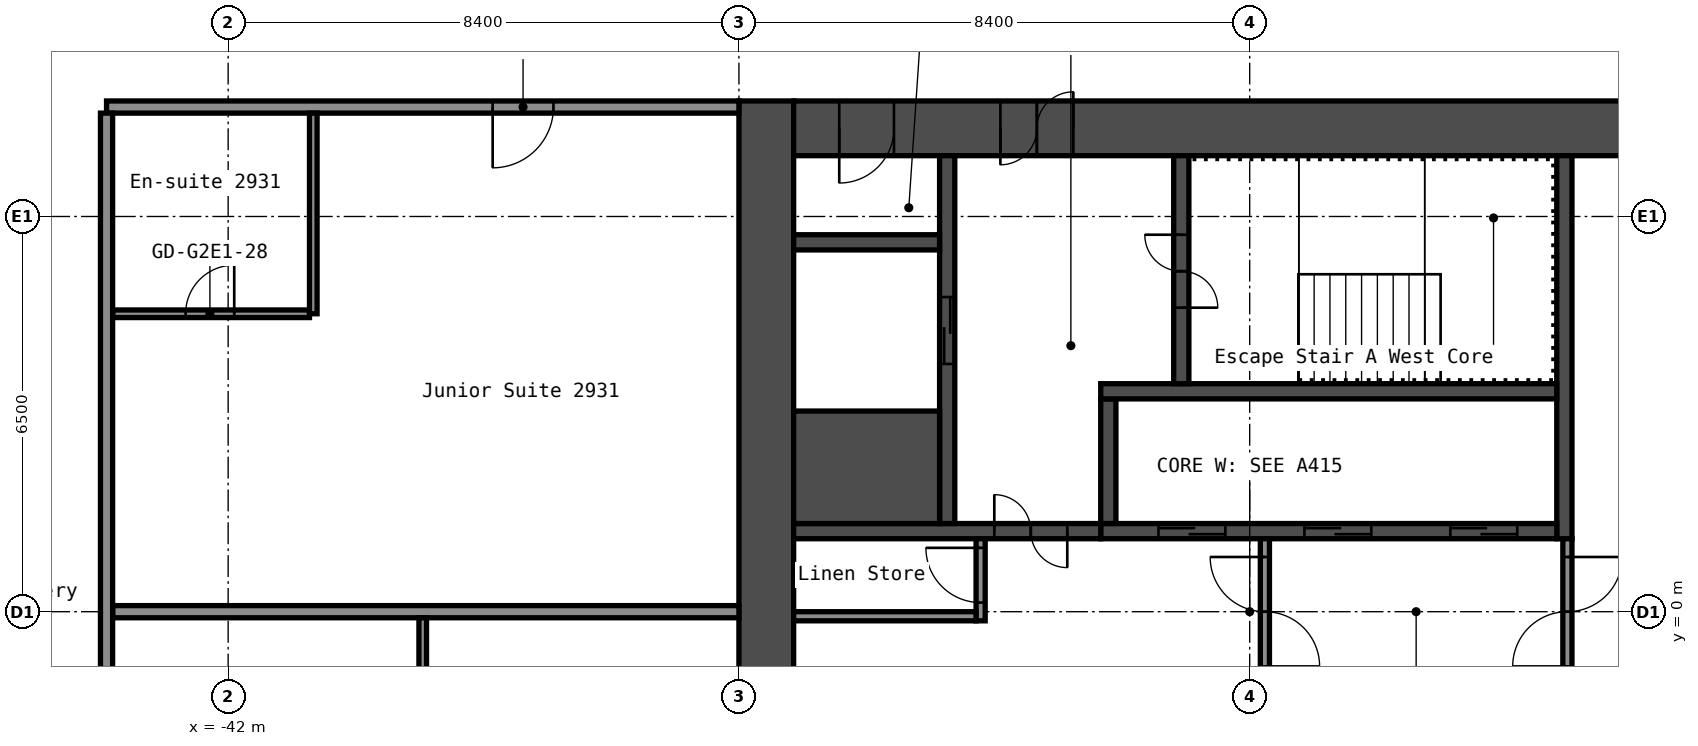
"""IFC4 building model, lengths in metres.
Left out: names, types, materials, properties, quantities, classifications, styles, units other than length and angle.
Written with IfcOpenShell. Run it as: python <this file> out.ifc"""

import sys

from ifc_helpers import new_model, si_unit, direction, frame, frame_2d, origin, place, context, subcontext, project, spatial, rectangle, extrude, element, fill, save


model = new_model("IFC4")
c1 = context("Model", 3, precision=1e-05, world=origin(), true_north=direction((0.0, 1.0)))
c2 = subcontext(c1, "Body", "Model", "MODEL_VIEW")
j1 = project(units=[si_unit("LENGTHUNIT", "METRE"), si_unit("PLANEANGLEUNIT", "RADIAN")], contexts=[c1])
p1 = place(None, origin())
s1 = spatial("IfcSite", under=j1, at=p1, CompositionType="ELEMENT")
p2 = place(p1, origin())
s2 = spatial("IfcBuilding", under=s1, at=p2, CompositionType="ELEMENT")
p3 = place(p2, frame((0.0, 0.0, 104.2)))
s3 = spatial("IfcBuildingStorey", under=s2, at=p3, CompositionType="ELEMENT", Elevation=104.2)
p4 = place(p3, frame((-33.15, -8.4, 0.0), z_axis=(0.0, 0.0, 1.0), x_axis=(0.0, 1.0, 0.0)))
e1 = element("IfcWall", 1, at=p4, inside=s3, PredefinedType="SHEAR", context=c2, shape_type="SweptSolid", body=[
    extrude(rectangle(XDim=16.8, YDim=0.9, at=frame_2d((8.4, 0.0))), origin(), (0.0, 0.0, 1.0), 2.8),
])
p5 = place(p3, frame((-32.7, 7.95, 0.0), z_axis=(0.0, 0.0, 1.0), x_axis=(1.0, 0.0, 0.0)))
e2 = element("IfcWall", 2, at=p5, inside=s3, PredefinedType="SHEAR", context=c2, shape_type="SweptSolid", body=[
    extrude(rectangle(XDim=15.0, YDim=0.9, at=frame_2d((7.5, 0.0))), origin(), (0.0, 0.0, 1.0), 2.8),
])
p6 = place(p5, frame((3.4, 0.0, 0.0)))
e3 = element("IfcOpeningElement", 3, at=p6, cuts=e2, PredefinedType="OPENING", context=c2, shape_type="SweptSolid", body=[
    extrude(rectangle(XDim=1.2, YDim=2.1, at=frame_2d((0.6, 1.05))), frame((0.0, 0.46, 0.0), z_axis=(0.0, -1.0, 0.0), x_axis=(1.0, 0.0, 0.0)), (0.0, 0.0, 1.0), 0.92),
])
p7 = place(p5, frame((0.75, 0.0, 0.0)))
e4 = element("IfcOpeningElement", 4, at=p7, cuts=e2, PredefinedType="OPENING", context=c2, shape_type="SweptSolid", body=[
    extrude(rectangle(XDim=0.9, YDim=2.1, at=frame_2d((0.45, 1.05))), frame((0.0, 0.46, 0.0), z_axis=(0.0, -1.0, 0.0), x_axis=(1.0, 0.0, 0.0)), (0.0, 0.0, 1.0), 0.92),
])
p8 = place(p3, frame((-20.025, 1.2, 0.0), z_axis=(0.0, 0.0, 1.0), x_axis=(0.0, 1.0, 0.0)))
e5 = element("IfcWall", 5, at=p8, inside=s3, PredefinedType="SHEAR", context=c2, shape_type="SweptSolid", body=[
    extrude(rectangle(XDim=6.3, YDim=0.25, at=frame_2d((3.15, 0.0))), origin(), (0.0, 0.0, 1.0), 2.8),
])
p9 = place(p3, frame((-27.65, 1.325, 0.0), z_axis=(0.0, 0.0, 1.0), x_axis=(1.0, 0.0, 0.0)))
e6 = element("IfcWall", 6, at=p9, inside=s3, PredefinedType="SHEAR", context=c2, shape_type="SweptSolid", body=[
    extrude(rectangle(XDim=7.5, YDim=0.25, at=frame_2d((3.75, 0.0))), origin(), (0.0, 0.0, 1.0), 2.8),
])
p10 = place(p9, frame((5.75, 0.0, 0.0)))
e7 = element("IfcOpeningElement", 7, at=p10, cuts=e6, PredefinedType="OPENING", context=c2, shape_type="SweptSolid", body=[
    extrude(rectangle(XDim=1.1, YDim=2.1, at=frame_2d((0.55, 1.05))), frame((0.0, 0.135, 0.0), z_axis=(0.0, -1.0, 0.0), x_axis=(1.0, 0.0, 0.0)), (0.0, 0.0, 1.0), 0.27),
])
p11 = place(p9, frame((3.35, 0.0, 0.0)))
e8 = element("IfcOpeningElement", 8, at=p11, cuts=e6, PredefinedType="OPENING", context=c2, shape_type="SweptSolid", body=[
    extrude(rectangle(XDim=1.1, YDim=2.1, at=frame_2d((0.55, 1.05))), frame((0.0, 0.135, 0.0), z_axis=(0.0, -1.0, 0.0), x_axis=(1.0, 0.0, 0.0)), (0.0, 0.0, 1.0), 0.27),
])
p12 = place(p9, frame((0.95, 0.0, 0.0)))
e9 = element("IfcOpeningElement", 9, at=p12, cuts=e6, PredefinedType="OPENING", context=c2, shape_type="SweptSolid", body=[
    extrude(rectangle(XDim=1.1, YDim=2.1, at=frame_2d((0.55, 1.05))), frame((0.0, 0.135, 0.0), z_axis=(0.0, -1.0, 0.0), x_axis=(1.0, 0.0, 0.0)), (0.0, 0.0, 1.0), 0.27),
])
p13 = place(p3, frame((-27.525, 1.45, 0.0), z_axis=(0.0, 0.0, 1.0), x_axis=(0.0, 1.0, 0.0)))
e10 = element("IfcWall", 10, at=p13, inside=s3, PredefinedType="SHEAR", context=c2, shape_type="SweptSolid", body=[
    extrude(rectangle(XDim=2.05, YDim=0.25, at=frame_2d((1.025, 0.0))), origin(), (0.0, 0.0, 1.0), 2.8),
])
p14 = place(p3, frame((-27.65, 3.625, 0.0), z_axis=(0.0, 0.0, 1.0), x_axis=(1.0, 0.0, 0.0)))
e11 = element("IfcWall", 11, at=p14, inside=s3, PredefinedType="SHEAR", context=c2, shape_type="SweptSolid", body=[
    extrude(rectangle(XDim=7.5, YDim=0.25, at=frame_2d((3.75, 0.0))), origin(), (0.0, 0.0, 1.0), 2.8),
])
p15 = place(p3, frame((-26.325, 3.75, 0.0), z_axis=(0.0, 0.0, 1.0), x_axis=(0.0, 1.0, 0.0)))
e12 = element("IfcWall", 12, at=p15, inside=s3, PredefinedType="SHEAR", context=c2, shape_type="SweptSolid", body=[
    extrude(rectangle(XDim=3.75, YDim=0.25, at=frame_2d((1.875, 0.0))), origin(), (0.0, 0.0, 1.0), 2.8),
])
p16 = place(p15, frame((1.25, 0.0, 0.0)))
e13 = element("IfcOpeningElement", 13, at=p16, cuts=e12, PredefinedType="OPENING", context=c2, shape_type="SweptSolid", body=[
    extrude(rectangle(XDim=1.2, YDim=2.1, at=frame_2d((0.6, 1.05))), frame((0.0, 0.135, 0.0), z_axis=(0.0, -1.0, 0.0), x_axis=(1.0, 0.0, 0.0)), (0.0, 0.0, 1.0), 0.27),
])
p17 = place(p3, frame((-32.7, 1.325, 0.0), z_axis=(0.0, 0.0, 1.0), x_axis=(1.0, 0.0, 0.0)))
e14 = element("IfcWall", 14, at=p17, inside=s3, PredefinedType="SHEAR", context=c2, shape_type="SweptSolid", body=[
    extrude(rectangle(XDim=5.05, YDim=0.25, at=frame_2d((2.525, 0.0))), origin(), (0.0, 0.0, 1.0), 2.8),
])
p18 = place(p17, frame((3.3, 0.0, 0.0)))
e15 = element("IfcOpeningElement", 15, at=p18, cuts=e14, PredefinedType="OPENING", context=c2, shape_type="SweptSolid", body=[
    extrude(rectangle(XDim=1.2, YDim=2.1, at=frame_2d((0.6, 1.05))), frame((0.0, 0.135, 0.0), z_axis=(0.0, -1.0, 0.0), x_axis=(1.0, 0.0, 0.0)), (0.0, 0.0, 1.0), 0.27),
])
p19 = place(p3, frame((-30.175, 1.45, 0.0), z_axis=(0.0, 0.0, 1.0), x_axis=(0.0, 1.0, 0.0)))
e16 = element("IfcWall", 16, at=p19, inside=s3, PredefinedType="SHEAR", context=c2, shape_type="SweptSolid", body=[
    extrude(rectangle(XDim=6.05, YDim=0.25, at=frame_2d((3.025, 0.0))), origin(), (0.0, 0.0, 1.0), 2.8),
])
p20 = place(p19, frame((2.625, 0.0, 0.0)))
e17 = element("IfcOpeningElement", 17, at=p20, cuts=e16, PredefinedType="OPENING", context=c2, shape_type="SweptSolid", body=[
    extrude(rectangle(XDim=1.1, YDim=2.1, at=frame_2d((0.55, 1.05))), frame((0.0, 0.135, 0.0), z_axis=(0.0, -1.0, 0.0), x_axis=(1.0, 0.0, 0.0)), (0.0, 0.0, 1.0), 0.27),
])
p21 = place(p3, frame((-32.7, 2.375, 0.0), z_axis=(0.0, 0.0, 1.0), x_axis=(1.0, 0.0, 0.0)))
e18 = element("IfcWall", 18, at=p21, inside=s3, PredefinedType="SHEAR", context=c2, shape_type="SweptSolid", body=[
    extrude(rectangle(XDim=2.4, YDim=1.85, at=frame_2d((1.2, 0.0))), origin(), (0.0, 0.0, 1.0), 2.8),
])
p22 = place(p3, frame((-32.7, 6.075, 0.0), z_axis=(0.0, 0.0, 1.0), x_axis=(1.0, 0.0, 0.0)))
e19 = element("IfcWall", 19, at=p22, inside=s3, PredefinedType="SHEAR", context=c2, shape_type="SweptSolid", body=[
    extrude(rectangle(XDim=2.4, YDim=0.25, at=frame_2d((1.2, 0.0))), origin(), (0.0, 0.0, 1.0), 2.8),
])
p23 = place(p3, frame((-19.975, -1.2, 0.0), z_axis=(0.0, 0.0, 1.0), x_axis=(0.0, 1.0, 0.0)))
e20 = element("IfcWall", 20, at=p23, inside=s3, PredefinedType="PARTITIONING", context=c2, shape_type="SweptSolid", body=[
    extrude(rectangle(XDim=2.4, YDim=0.15, at=frame_2d((1.2, 0.0))), origin(), (0.0, 0.0, 1.0), 2.8),
])
p24 = place(p23, frame((0.3, 0.0, 0.0)))
e21 = element("IfcOpeningElement", 21, at=p24, cuts=e20, PredefinedType="OPENING", context=c2, shape_type="SweptSolid", body=[
    extrude(rectangle(XDim=1.8, YDim=2.1, at=frame_2d((0.9, 1.05))), frame((0.0, 0.085, 0.0), z_axis=(0.0, -1.0, 0.0), x_axis=(1.0, 0.0, 0.0)), (0.0, 0.0, 1.0), 0.17),
])
p25 = place(p3, frame((-24.95, -1.2, 0.0), z_axis=(0.0, 0.0, 1.0), x_axis=(0.0, 1.0, 0.0)))
e22 = element("IfcWall", 22, at=p25, inside=s3, PredefinedType="PARTITIONING", context=c2, shape_type="SweptSolid", body=[
    extrude(rectangle(XDim=2.4, YDim=0.15, at=frame_2d((1.2, 0.0))), origin(), (0.0, 0.0, 1.0), 2.8),
])
p26 = place(p25, frame((0.3, 0.0, 0.0)))
e23 = element("IfcOpeningElement", 23, at=p26, cuts=e22, PredefinedType="OPENING", context=c2, shape_type="SweptSolid", body=[
    extrude(rectangle(XDim=1.8, YDim=2.1, at=frame_2d((0.9, 1.05))), frame((0.0, 0.085, 0.0), z_axis=(0.0, -1.0, 0.0), x_axis=(1.0, 0.0, 0.0)), (0.0, 0.0, 1.0), 0.17),
])
p27 = place(p3, frame((-29.625, -0.15, 0.0), z_axis=(0.0, 0.0, 1.0), x_axis=(0.0, 1.0, 0.0)))
e24 = element("IfcWall", 24, at=p27, inside=s3, PredefinedType="PARTITIONING", context=c2, shape_type="SweptSolid", body=[
    extrude(rectangle(XDim=1.35, YDim=0.15, at=frame_2d((0.675, 0.0))), origin(), (0.0, 0.0, 1.0), 2.8),
])
p28 = place(p27, frame((0.3, 0.0, 0.0)))
e25 = element("IfcOpeningElement", 25, at=p28, cuts=e24, PredefinedType="OPENING", context=c2, shape_type="SweptSolid", body=[
    extrude(rectangle(XDim=0.9, YDim=2.1, at=frame_2d((0.45, 1.05))), frame((0.0, 0.085, 0.0), z_axis=(0.0, -1.0, 0.0), x_axis=(1.0, 0.0, 0.0)), (0.0, 0.0, 1.0), 0.17),
])
p29 = place(p3, frame((-32.7, -0.075, 0.0), z_axis=(0.0, 0.0, 1.0), x_axis=(1.0, 0.0, 0.0)))
e26 = element("IfcWall", 26, at=p29, inside=s3, PredefinedType="PARTITIONING", context=c2, shape_type="SweptSolid", body=[
    extrude(rectangle(XDim=3.0, YDim=0.15, at=frame_2d((1.5, 0.0))), origin(), (0.0, 0.0, 1.0), 2.8),
])
p30 = place(p3, frame((-43.9, 0.0, 0.0), z_axis=(0.0, 0.0, 1.0), x_axis=(1.0, 0.0, 0.0)))
e27 = element("IfcWall", 27, at=p30, inside=s3, PredefinedType="PARTITIONING", context=c2, shape_type="SweptSolid", body=[
    extrude(rectangle(XDim=10.3, YDim=0.2, at=frame_2d((5.15, 0.0))), origin(), (0.0, 0.0, 1.0), 2.8),
])
p31 = place(p3, frame((-43.9, 4.9, 0.0), z_axis=(0.0, 0.0, 1.0), x_axis=(1.0, 0.0, 0.0)))
e28 = element("IfcWall", 28, at=p31, inside=s3, PredefinedType="PARTITIONING", context=c2, shape_type="SweptSolid", body=[
    extrude(rectangle(XDim=3.237, YDim=0.125, at=frame_2d((1.619, 0.0))), origin(), (0.0, 0.0, 1.0), 2.8),
])
p32 = place(p31, frame((1.2, 0.0, 0.0)))
e29 = element("IfcOpeningElement", 29, at=p32, cuts=e28, PredefinedType="OPENING", context=c2, shape_type="SweptSolid", body=[
    extrude(rectangle(XDim=0.8, YDim=2.1, at=frame_2d((0.4, 1.05))), frame((0.0, 0.073, 0.0), z_axis=(0.0, -1.0, 0.0), x_axis=(1.0, 0.0, 0.0)), (0.0, 0.0, 1.0), 0.145),
])
p33 = place(p3, frame((-44.0, 8.3, 0.0), z_axis=(0.0, 0.0, 1.0), x_axis=(1.0, 0.0, 0.0)))
e30 = element("IfcWall", 30, at=p33, inside=s3, PredefinedType="PARTITIONING", context=c2, shape_type="SweptSolid", body=[
    extrude(rectangle(XDim=10.4, YDim=0.2, at=frame_2d((5.2, 0.0))), origin(), (0.0, 0.0, 1.0), 2.8),
])
p34 = place(p33, frame((6.35, 0.0, 0.0)))
e31 = element("IfcOpeningElement", 31, at=p34, cuts=e30, PredefinedType="OPENING", context=c2, shape_type="SweptSolid", body=[
    extrude(rectangle(XDim=1.0, YDim=2.1, at=frame_2d((0.5, 1.05))), frame((0.0, 0.11, 0.0), z_axis=(0.0, -1.0, 0.0), x_axis=(1.0, 0.0, 0.0)), (0.0, 0.0, 1.0), 0.22),
])
p35 = place(p3, frame((-44.0, -8.2, 0.0), z_axis=(0.0, 0.0, 1.0), x_axis=(0.0, 1.0, 0.0)))
e32 = element("IfcWall", 32, at=p35, inside=s3, PredefinedType="PARTITIONING", context=c2, shape_type="SweptSolid", body=[
    extrude(rectangle(XDim=16.4, YDim=0.2, at=frame_2d((8.2, 0.0))), origin(), (0.0, 0.0, 1.0), 2.8),
])
p36 = place(p3, frame((-40.6, 4.9, 0.0), z_axis=(0.0, 0.0, 1.0), x_axis=(0.0, 1.0, 0.0)))
e33 = element("IfcWall", 33, at=p36, inside=s3, PredefinedType="PARTITIONING", context=c2, shape_type="SweptSolid", body=[
    extrude(rectangle(XDim=3.3, YDim=0.125, at=frame_2d((1.65, 0.0))), origin(), (0.0, 0.0, 1.0), 2.8),
])
p37 = place(p3, frame((-38.8, -8.2, 0.0), z_axis=(0.0, 0.0, 1.0), x_axis=(0.0, 1.0, 0.0)))
e34 = element("IfcWall", 34, at=p37, inside=s3, PredefinedType="PARTITIONING", context=c2, shape_type="SweptSolid", body=[
    extrude(rectangle(XDim=8.1, YDim=0.125, at=frame_2d((4.05, 0.0))), origin(), (0.0, 0.0, 1.0), 2.8),
])
p38 = place(p37, frame((4.05, 0.0, 0.0)))
e35 = element("IfcOpeningElement", 35, at=p38, cuts=e34, PredefinedType="OPENING", context=c2, shape_type="SweptSolid", body=[
    extrude(rectangle(XDim=0.9, YDim=2.1, at=frame_2d((0.45, 1.05))), frame((0.0, 0.073, 0.0), z_axis=(0.0, -1.0, 0.0), x_axis=(1.0, 0.0, 0.0)), (0.0, 0.0, 1.0), 0.145),
])
p39 = place(p6, origin())
e36 = element("IfcDoor", 36, at=p39, inside=s3, OperationType="DOUBLE_DOOR_SINGLE_SWING", PredefinedType="DOOR", context=c2, shape_type="SweptSolid", body=[
    extrude(rectangle(XDim=1.2, YDim=2.1, at=frame_2d((0.6, 1.05))), frame((0.0, 0.025, 0.0), z_axis=(0.0, -1.0, 0.0), x_axis=(1.0, 0.0, 0.0)), (0.0, 0.0, 1.0), 0.05),
])
fill(e3, e36)
p40 = place(p7, origin())
e37 = element("IfcDoor", 37, at=p40, inside=s3, OperationType="SINGLE_SWING_LEFT", PredefinedType="DOOR", context=c2, shape_type="SweptSolid", body=[
    extrude(rectangle(XDim=0.9, YDim=2.1, at=frame_2d((0.45, 1.05))), frame((0.0, 0.025, 0.0), z_axis=(0.0, -1.0, 0.0), x_axis=(1.0, 0.0, 0.0)), (0.0, 0.0, 1.0), 0.05),
])
fill(e4, e37)
p41 = place(p16, origin())
e38 = element("IfcDoor", 38, at=p41, inside=s3, OperationType="DOUBLE_DOOR_SINGLE_SWING", PredefinedType="DOOR", context=c2, shape_type="SweptSolid", body=[
    extrude(rectangle(XDim=1.2, YDim=2.1, at=frame_2d((0.6, 1.05))), frame((0.0, 0.025, 0.0), z_axis=(0.0, -1.0, 0.0), x_axis=(1.0, 0.0, 0.0)), (0.0, 0.0, 1.0), 0.05),
])
fill(e13, e38)
p42 = place(p18, origin())
e39 = element("IfcDoor", 39, at=p42, inside=s3, OperationType="DOUBLE_DOOR_SINGLE_SWING", PredefinedType="DOOR", context=c2, shape_type="SweptSolid", body=[
    extrude(rectangle(XDim=1.2, YDim=2.1, at=frame_2d((0.6, 1.05))), frame((0.0, 0.025, 0.0), z_axis=(0.0, -1.0, 0.0), x_axis=(1.0, 0.0, 0.0)), (0.0, 0.0, 1.0), 0.05),
])
fill(e15, e39)
p43 = place(p24, origin())
e40 = element("IfcDoor", 40, at=p43, inside=s3, OperationType="DOUBLE_DOOR_SINGLE_SWING", PredefinedType="DOOR", context=c2, shape_type="SweptSolid", body=[
    extrude(rectangle(XDim=1.8, YDim=2.1, at=frame_2d((0.9, 1.05))), frame((0.0, 0.025, 0.0), z_axis=(0.0, -1.0, 0.0), x_axis=(1.0, 0.0, 0.0)), (0.0, 0.0, 1.0), 0.05),
])
fill(e21, e40)
p44 = place(p26, origin())
e41 = element("IfcDoor", 41, at=p44, inside=s3, OperationType="DOUBLE_DOOR_SINGLE_SWING", PredefinedType="DOOR", context=c2, shape_type="SweptSolid", body=[
    extrude(rectangle(XDim=1.8, YDim=2.1, at=frame_2d((0.9, 1.05))), frame((0.0, 0.025, 0.0), z_axis=(0.0, -1.0, 0.0), x_axis=(1.0, 0.0, 0.0)), (0.0, 0.0, 1.0), 0.05),
])
fill(e23, e41)
p45 = place(p28, origin())
e42 = element("IfcDoor", 42, at=p45, inside=s3, OperationType="SINGLE_SWING_LEFT", PredefinedType="DOOR", context=c2, shape_type="SweptSolid", body=[
    extrude(rectangle(XDim=0.9, YDim=2.1, at=frame_2d((0.45, 1.05))), frame((0.0, 0.025, 0.0), z_axis=(0.0, -1.0, 0.0), x_axis=(1.0, 0.0, 0.0)), (0.0, 0.0, 1.0), 0.05),
])
fill(e25, e42)
p46 = place(p10, origin())
e43 = element("IfcDoor", 43, at=p46, inside=s3, OperationType="DOUBLE_DOOR_SLIDING", PredefinedType="DOOR", context=c2, shape_type="SweptSolid", body=[
    extrude(rectangle(XDim=1.1, YDim=2.1, at=frame_2d((0.55, 1.05))), frame((0.0, 0.025, 0.0), z_axis=(0.0, -1.0, 0.0), x_axis=(1.0, 0.0, 0.0)), (0.0, 0.0, 1.0), 0.05),
])
fill(e7, e43)
p47 = place(p11, origin())
e44 = element("IfcDoor", 44, at=p47, inside=s3, OperationType="DOUBLE_DOOR_SLIDING", PredefinedType="DOOR", context=c2, shape_type="SweptSolid", body=[
    extrude(rectangle(XDim=1.1, YDim=2.1, at=frame_2d((0.55, 1.05))), frame((0.0, 0.025, 0.0), z_axis=(0.0, -1.0, 0.0), x_axis=(1.0, 0.0, 0.0)), (0.0, 0.0, 1.0), 0.05),
])
fill(e8, e44)
p48 = place(p12, origin())
e45 = element("IfcDoor", 45, at=p48, inside=s3, OperationType="DOUBLE_DOOR_SLIDING", PredefinedType="DOOR", context=c2, shape_type="SweptSolid", body=[
    extrude(rectangle(XDim=1.1, YDim=2.1, at=frame_2d((0.55, 1.05))), frame((0.0, 0.025, 0.0), z_axis=(0.0, -1.0, 0.0), x_axis=(1.0, 0.0, 0.0)), (0.0, 0.0, 1.0), 0.05),
])
fill(e9, e45)
p49 = place(p20, origin())
e46 = element("IfcDoor", 46, at=p49, inside=s3, OperationType="DOUBLE_DOOR_SLIDING", PredefinedType="DOOR", context=c2, shape_type="SweptSolid", body=[
    extrude(rectangle(XDim=1.1, YDim=2.1, at=frame_2d((0.55, 1.05))), frame((0.0, 0.025, 0.0), z_axis=(0.0, -1.0, 0.0), x_axis=(1.0, 0.0, 0.0)), (0.0, 0.0, 1.0), 0.05),
])
fill(e17, e46)
p50 = place(p32, origin())
e47 = element("IfcDoor", 47, at=p50, inside=s3, OperationType="SINGLE_SWING_LEFT", PredefinedType="DOOR", context=c2, shape_type="SweptSolid", body=[
    extrude(rectangle(XDim=0.8, YDim=2.1, at=frame_2d((0.4, 1.05))), frame((0.0, 0.025, 0.0), z_axis=(0.0, -1.0, 0.0), x_axis=(1.0, 0.0, 0.0)), (0.0, 0.0, 1.0), 0.05),
])
fill(e29, e47)
p51 = place(p34, origin())
e48 = element("IfcDoor", 48, at=p51, inside=s3, OperationType="SINGLE_SWING_LEFT", PredefinedType="DOOR", context=c2, shape_type="SweptSolid", body=[
    extrude(rectangle(XDim=1.0, YDim=2.1, at=frame_2d((0.5, 1.05))), frame((0.0, 0.025, 0.0), z_axis=(0.0, -1.0, 0.0), x_axis=(1.0, 0.0, 0.0)), (0.0, 0.0, 1.0), 0.05),
])
fill(e31, e48)
save(model, sys.argv[1])
